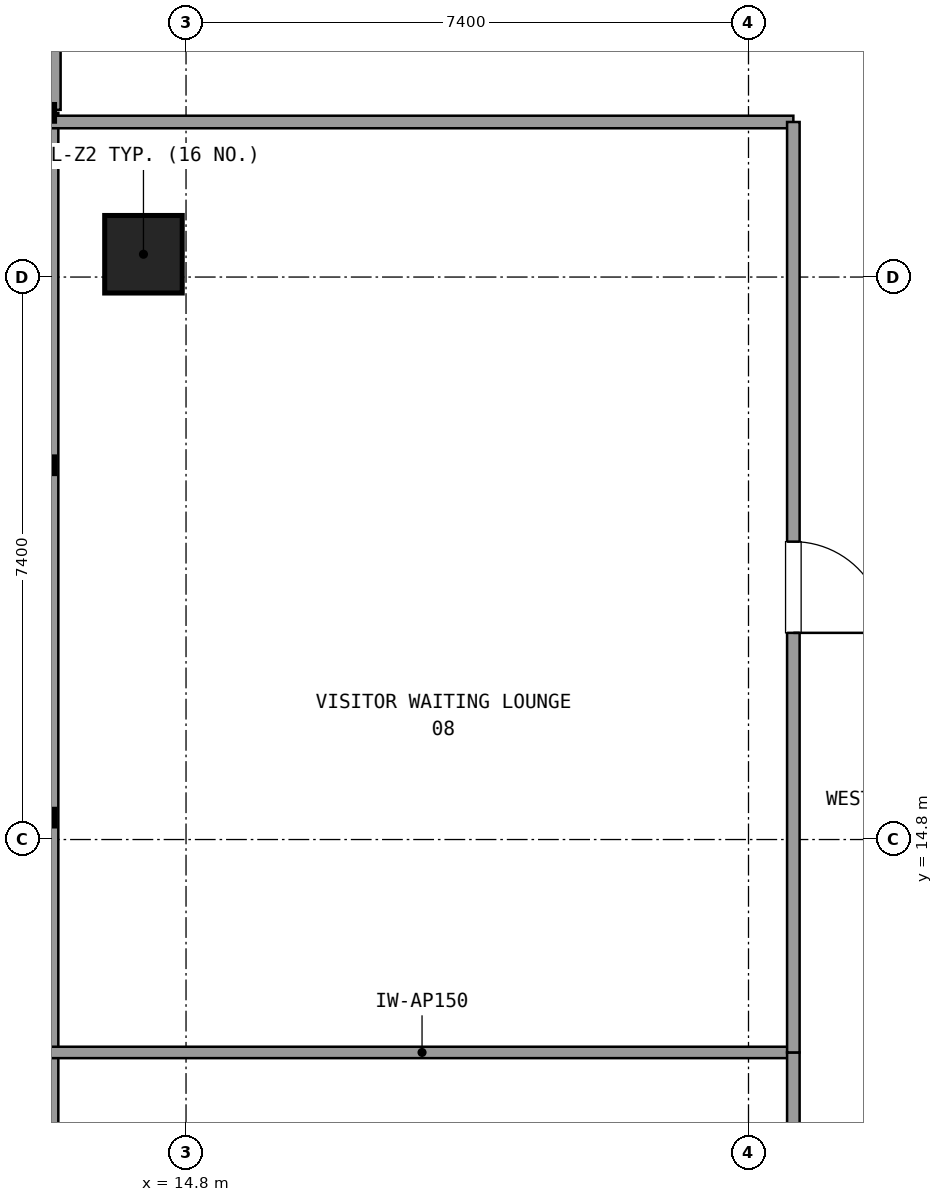
"""IFC4 building model, lengths in metres.
Left out: names, types, materials, properties, quantities, classifications, styles, units other than length and angle.
Written with IfcOpenShell. Run it as: python <this file> out.ifc"""

import sys

from ifc_helpers import new_model, si_unit, direction, frame, frame_2d, origin, origin_2d, place, context, subcontext, project, spatial, rectangle, extrude, element, fill, save


model = new_model("IFC4")
c1 = context("Model", 3, precision=1e-05, world=origin(), true_north=direction((0.0, 1.0)))
c2 = subcontext(c1, "Body", "Model", "MODEL_VIEW")
j1 = project(units=[si_unit("LENGTHUNIT", "METRE"), si_unit("PLANEANGLEUNIT", "RADIAN")], contexts=[c1])
p1 = place(None, origin())
s1 = spatial("IfcSite", under=j1, at=p1, CompositionType="ELEMENT")
p2 = place(p1, origin())
s2 = spatial("IfcBuilding", under=s1, at=p2, CompositionType="ELEMENT")
p3 = place(p2, frame((0.0, 0.0, 120.78)))
s3 = spatial("IfcBuildingStorey", under=s2, at=p3, CompositionType="ELEMENT", Elevation=120.78)
p4 = place(p3, frame((14.24, 22.5, 0.021), z_axis=(0.084850379912, 0.0, 0.996393703828), x_axis=(0.0, 1.0, 0.0)))
e1 = element("IfcColumn", 1, at=p4, inside=s3, PredefinedType="COLUMN", context=c2, shape_type="SweptSolid", body=[
    extrude(rectangle(XDim=1.02, YDim=1.02, at=origin_2d()), origin(), (0.0, 0.0, 1.0), 3.571),
])
p5 = place(p3, frame((13.0, 27.4, 0.0), z_axis=(0.0, 0.0, 1.0), x_axis=(0.0, -1.0, 0.0)))
e2 = element("IfcWall", 2, at=p5, inside=s3, PredefinedType="SOLIDWALL", context=c2, shape_type="SweptSolid", body=[
    extrude(rectangle(XDim=3.0, YDim=0.3, at=frame_2d((1.5, 0.0))), origin(), (0.0, 0.0, 1.0), 2.65),
])
p6 = place(p5, frame((0.9, 0.0, 0.0)))
e3 = element("IfcOpeningElement", 3, at=p6, cuts=e2, PredefinedType="OPENING", context=c2, shape_type="SweptSolid", body=[
    extrude(rectangle(XDim=1.2, YDim=2.2, at=frame_2d((0.6, 1.1))), frame((0.0, 0.16, 0.0), z_axis=(0.0, -1.0, 0.0), x_axis=(1.0, 0.0, 0.0)), (0.0, 0.0, 1.0), 0.32),
])
p7 = place(p3, frame((13.0, 24.36, 0.0), z_axis=(0.0, 0.0, 1.0), x_axis=(0.0, -1.0, 0.0)))
e4 = element("IfcWall", 4, at=p7, inside=s3, PredefinedType="SOLIDWALL", context=c2, shape_type="SweptSolid", body=[
    extrude(rectangle(XDim=13.908, YDim=0.24, at=frame_2d((6.954, 0.0))), origin(), (0.0, 0.0, 1.0), 0.85),
])
p8 = place(p3, frame((13.02, 24.24, 0.0), z_axis=(0.0, 0.0, 1.0), x_axis=(1.0, 0.0, 0.0)))
e5 = element("IfcWall", 5, at=p8, inside=s3, PredefinedType="PARTITIONING", context=c2, shape_type="SweptSolid", body=[
    extrude(rectangle(XDim=9.77, YDim=0.165, at=frame_2d((4.885, 0.0))), origin(), (0.0, 0.0, 1.0), 2.59),
])
p9 = place(p3, frame((22.79, 11.999, 0.0), z_axis=(0.0, 0.0, 1.0), x_axis=(-1.0, 0.0, 0.0)))
e6 = element("IfcWall", 6, at=p9, inside=s3, PredefinedType="PARTITIONING", context=c2, shape_type="SweptSolid", body=[
    extrude(rectangle(XDim=9.77, YDim=0.15, at=frame_2d((4.885, 0.0))), origin(), (0.0, 0.0, 1.0), 2.59),
])
p10 = place(p3, frame((22.79, 4.496, 0.0), z_axis=(0.0, 0.0, 1.0), x_axis=(0.0, 1.0, 0.0)))
e7 = element("IfcWall", 7, at=p10, inside=s3, PredefinedType="PARTITIONING", context=c2, shape_type="SweptSolid", body=[
    extrude(rectangle(XDim=7.503, YDim=0.165, at=frame_2d((3.751, 0.0))), origin(), (0.0, 0.0, 1.0), 2.59),
])
p11 = place(p10, frame((3.151, 0.0, 0.0)))
e8 = element("IfcOpeningElement", 8, at=p11, cuts=e7, PredefinedType="OPENING", context=c2, shape_type="SweptSolid", body=[
    extrude(rectangle(XDim=1.2, YDim=2.15, at=frame_2d((0.6, 1.075))), frame((0.0, 0.093, 0.0), z_axis=(0.0, -1.0, 0.0), x_axis=(1.0, 0.0, 0.0)), (0.0, 0.0, 1.0), 0.185),
])
p12 = place(p3, frame((22.79, 11.999, 0.0), z_axis=(0.0, 0.0, 1.0), x_axis=(0.0, 1.0, 0.0)))
e9 = element("IfcWall", 9, at=p12, inside=s3, PredefinedType="PARTITIONING", context=c2, shape_type="SweptSolid", body=[
    extrude(rectangle(XDim=12.241, YDim=0.165, at=frame_2d((6.121, 0.0))), origin(), (0.0, 0.0, 1.0), 2.59),
])
p13 = place(p12, frame((5.52, 0.0, 0.0)))
e10 = element("IfcOpeningElement", 10, at=p13, cuts=e9, PredefinedType="OPENING", context=c2, shape_type="SweptSolid", body=[
    extrude(rectangle(XDim=1.2, YDim=2.15, at=frame_2d((0.6, 1.075))), frame((0.0, 0.093, 0.0), z_axis=(0.0, -1.0, 0.0), x_axis=(1.0, 0.0, 0.0)), (0.0, 0.0, 1.0), 0.185),
])
p14 = place(p13, frame((1.2, 0.0, 0.0), z_axis=(0.0, 0.0, 1.0), x_axis=(-1.0, 0.0, 0.0)))
e11 = element("IfcDoor", 11, at=p14, inside=s3, OperationType="SINGLE_SWING_LEFT", PredefinedType="DOOR", context=c2, shape_type="SweptSolid", body=[
    extrude(rectangle(XDim=1.2, YDim=2.15, at=frame_2d((0.6, 1.075))), frame((0.0, 0.025, 0.0), z_axis=(0.0, -1.0, 0.0), x_axis=(1.0, 0.0, 0.0)), (0.0, 0.0, 1.0), 0.05),
])
fill(e10, e11)
save(model, sys.argv[1])
